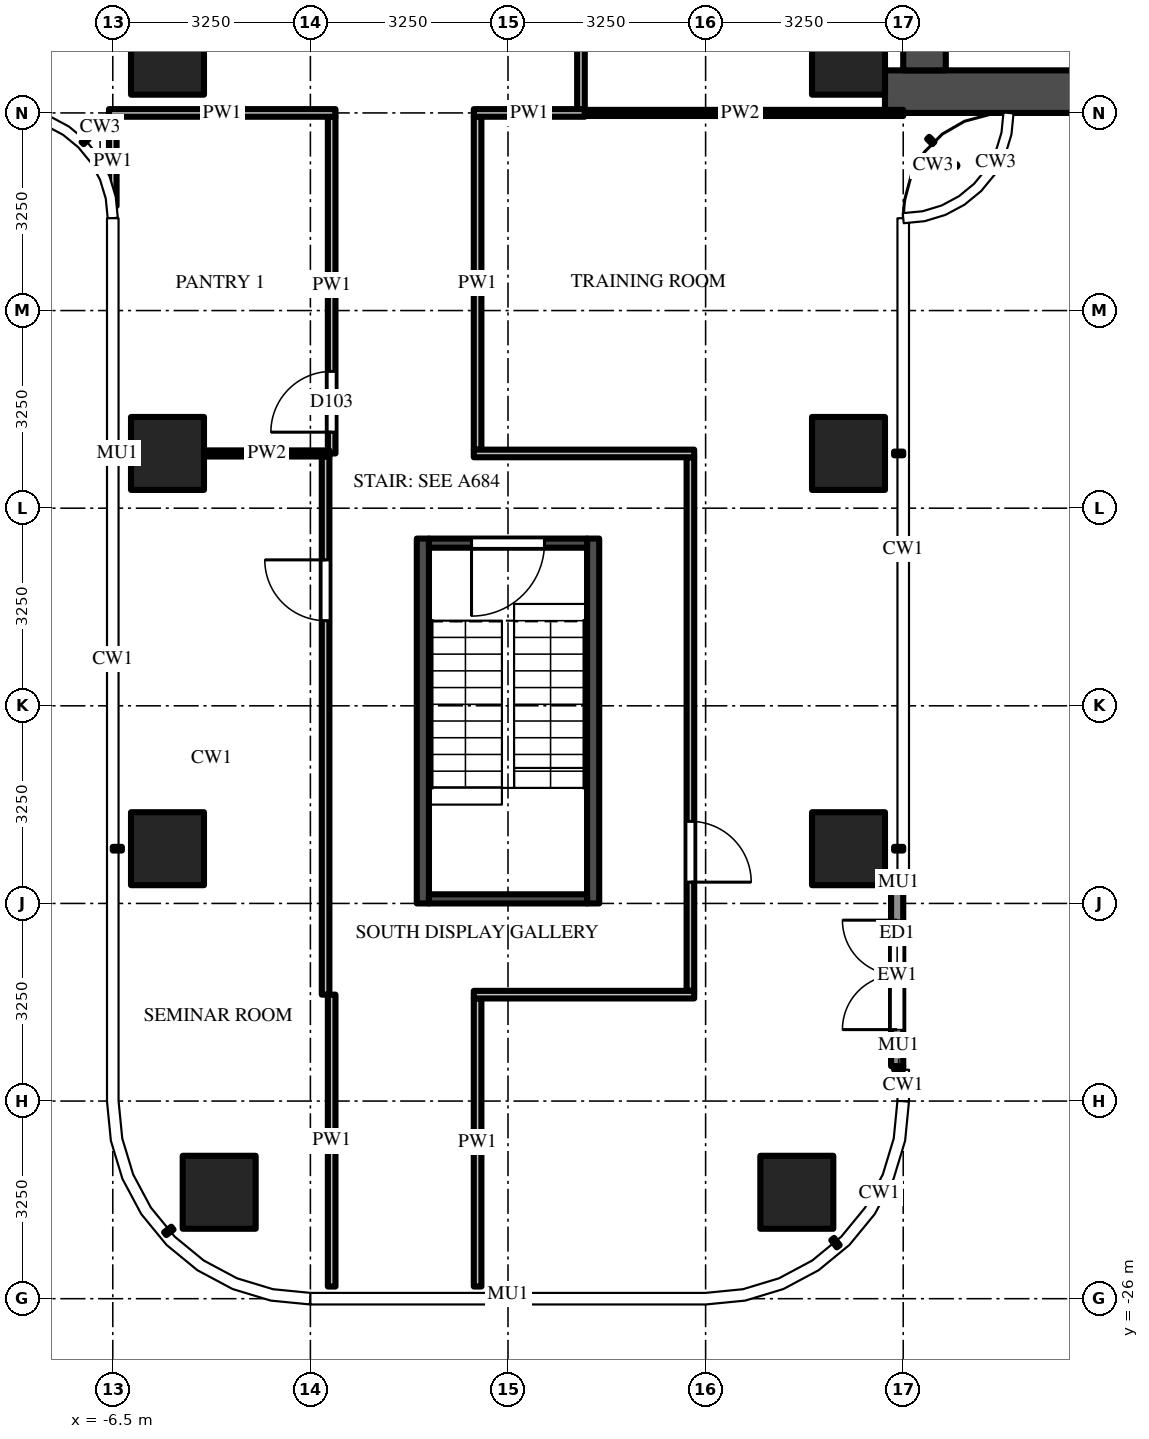
"""IFC4 building model, lengths in metres.
Left out: names, types, materials, properties, quantities, classifications, styles, units other than length and angle.
Written with IfcOpenShell. Run it as: python <this file> out.ifc"""

import sys

from ifc_helpers import new_model, si_unit, direction, frame, frame_2d, origin, origin_2d, place, context, subcontext, project, spatial, rectangle, extrude, source, transform, mapped, element, fill, save


model = new_model("IFC4")
c1 = context("Model", 3, precision=1e-05, world=origin(), true_north=direction((0.0, 1.0)))
c2 = subcontext(c1, "Body", "Model", "MODEL_VIEW")
j1 = project(units=[si_unit("LENGTHUNIT", "METRE"), si_unit("PLANEANGLEUNIT", "RADIAN")], contexts=[c1])
p1 = place(None, origin())
s1 = spatial("IfcSite", under=j1, at=p1, CompositionType="ELEMENT")
p2 = place(p1, origin())
s2 = spatial("IfcBuilding", under=s1, at=p2, CompositionType="ELEMENT")
p3 = place(p2, frame((0.0, 0.0, 169.8)))
s3 = spatial("IfcBuildingStorey", under=s2, at=p3, CompositionType="ELEMENT", Elevation=169.8)
m1 = source(origin(), c2, "Body", "SweptSolid", [
    extrude(rectangle(XDim=1.2, YDim=1.2, at=origin_2d()), origin(), (0.0, 0.0, 1.0), 3.9),
])
for number, where, z_axis, x_axis in (
    (1, (5.6, -5.6, 0.0), (0.0, 0.0, 1.0), (1.0, 0.0, 0.0)),
    (2, (-5.6, -5.6, 0.0), (0.0, 0.0, 1.0), (1.0, 0.0, 0.0)),
    (3, (5.6, -12.1, 0.0), (0.0, 0.0, 1.0), (1.0, 0.0, 0.0)),
    (4, (5.6, -18.6, 0.0), (0.0, 0.0, 1.0), (1.0, 0.0, 0.0)),
    (5, (4.75, -24.25, 0.0), (0.0, 0.0, 1.0), (1.0, 0.0, 0.0)),
    (6, (-5.6, -12.1, 0.0), (0.0, 0.0, 1.0), (1.0, 0.0, 0.0)),
    (7, (-5.6, -18.6, 0.0), (0.0, 0.0, 1.0), (1.0, 0.0, 0.0)),
    (8, (-4.75, -24.25, 0.0), (0.0, 0.0, 1.0), (1.0, 0.0, 0.0)),
):
    element("IfcColumn", number, at=place(p3, frame(where, z_axis=z_axis, x_axis=x_axis)), inside=s3, PredefinedType="COLUMN", context=c2, shape_type="MappedRepresentation", body=[
        mapped(m1, transform((0.0, 0.0, 0.0))),
    ])
m2 = source(origin(), c2, "Body", "SweptSolid", [
    extrude(rectangle(XDim=16.55, YDim=0.7, at=frame_2d((8.275, 0.0))), origin(), (0.0, 0.0, 1.0), 3.7),
])
p4 = place(p3, frame((6.2, -6.15, 0.0), z_axis=(0.0, 0.0, 1.0), x_axis=(1.0, 0.0, 0.0)))
e9 = element("IfcWall", 9, at=p4, inside=s3, PredefinedType="SHEAR", context=c2, shape_type="MappedRepresentation", body=[
    mapped(m2, transform((0.0, 0.0, 0.0))),
])
m3 = source(origin(), c2, "Body", "SweptSolid", [
    extrude(rectangle(XDim=9.05, YDim=0.7, at=frame_2d((4.525, 0.0))), origin(), (0.0, 0.0, 1.0), 3.7),
])
p5 = place(p3, frame((6.85, -5.8, 0.0), z_axis=(0.0, 0.0, 1.0), x_axis=(0.0, 1.0, 0.0)))
e10 = element("IfcWall", 10, at=p5, inside=s3, PredefinedType="SHEAR", context=c2, shape_type="MappedRepresentation", body=[
    mapped(m3, transform((0.0, 0.0, 0.0))),
])
m4 = source(origin(), c2, "Body", "SweptSolid", [
    extrude(rectangle(XDim=1.8, YDim=2.1, at=frame_2d((0.9, 1.05))), frame((0.0, 0.36, 0.0), z_axis=(0.0, -1.0, 0.0), x_axis=(1.0, 0.0, 0.0)), (0.0, 0.0, 1.0), 0.72),
])
p6 = place(p5, frame((3.15, 0.0, 0.0)))
e11 = element("IfcOpeningElement", 11, at=p6, cuts=e10, PredefinedType="OPENING", context=c2, shape_type="MappedRepresentation", body=[
    mapped(m4, transform((0.0, 0.0, 0.0))),
])
m5 = source(origin(), c2, "Body", "SweptSolid", [
    extrude(rectangle(XDim=6.0, YDim=0.2, at=frame_2d((3.0, 0.0))), origin(), (0.0, 0.0, 1.0), 3.7),
])
for number, where, z_axis, x_axis in (
    (12, (1.4, -13.5, 0.0), (0.0, 0.0, 1.0), (0.0, -1.0, 0.0)),
    (13, (-1.4, -13.5, 0.0), (0.0, 0.0, 1.0), (0.0, -1.0, 0.0)),
):
    element("IfcWall", number, at=place(p3, frame(where, z_axis=z_axis, x_axis=x_axis)), inside=s3, PredefinedType="SHEAR", context=c2, shape_type="MappedRepresentation", body=[
        mapped(m5, transform((0.0, 0.0, 0.0))),
    ])
m6 = source(origin(), c2, "Body", "SweptSolid", [
    extrude(rectangle(XDim=2.6, YDim=0.15, at=frame_2d((1.3, 0.0))), origin(), (0.0, 0.0, 1.0), 3.7),
])
p7 = place(p3, frame((1.3, -13.575, 0.0), z_axis=(0.0, 0.0, 1.0), x_axis=(-1.0, 0.0, 0.0)))
e14 = element("IfcWall", 14, at=p7, inside=s3, PredefinedType="SHEAR", context=c2, shape_type="MappedRepresentation", body=[
    mapped(m6, transform((0.0, 0.0, 0.0))),
])
m7 = source(origin(), c2, "Body", "SweptSolid", [
    extrude(rectangle(XDim=1.2, YDim=2.1, at=frame_2d((0.6, 1.05))), frame((0.0, 0.085, 0.0), z_axis=(0.0, -1.0, 0.0), x_axis=(1.0, 0.0, 0.0)), (0.0, 0.0, 1.0), 0.17),
])
p8 = place(p7, frame((0.7, 0.0, 0.0)))
e15 = element("IfcOpeningElement", 15, at=p8, cuts=e14, PredefinedType="OPENING", context=c2, shape_type="MappedRepresentation", body=[
    mapped(m7, transform((0.0, 0.0, 0.0))),
])
p9 = place(p3, frame((1.3, -19.425, 0.0), z_axis=(0.0, 0.0, 1.0), x_axis=(-1.0, 0.0, 0.0)))
e16 = element("IfcWall", 16, at=p9, inside=s3, PredefinedType="SHEAR", context=c2, shape_type="MappedRepresentation", body=[
    mapped(m6, transform((0.0, 0.0, 0.0))),
])
m8 = source(origin(), c2, "Body", "SweptSolid", [
    extrude(rectangle(XDim=3.0, YDim=0.2, at=frame_2d((1.5, 0.0))), origin(), (0.0, 0.0, 1.0), 3.7),
])
p10 = place(p3, frame((6.4, -22.175, 0.0), z_axis=(0.0, 0.0, 1.0), x_axis=(0.0, 1.0, 0.0)))
e17 = element("IfcWall", 17, at=p10, inside=s3, PredefinedType="SOLIDWALL", context=c2, shape_type="MappedRepresentation", body=[
    mapped(m8, transform((0.0, 0.0, 0.0))),
])
m9 = source(origin(), c2, "Body", "SweptSolid", [
    extrude(rectangle(XDim=1.8, YDim=2.4, at=frame_2d((0.9, 1.2))), frame((0.0, 0.11, 0.0), z_axis=(0.0, -1.0, 0.0), x_axis=(1.0, 0.0, 0.0)), (0.0, 0.0, 1.0), 0.22),
])
p11 = place(p10, frame((0.6, 0.0, 0.0)))
e18 = element("IfcOpeningElement", 18, at=p11, cuts=e17, PredefinedType="OPENING", context=c2, shape_type="MappedRepresentation", body=[
    mapped(m9, transform((0.0, 0.0, 0.0))),
])
m10 = source(origin(), c2, "Body", "SweptSolid", [
    extrude(rectangle(XDim=1.469, YDim=0.125, at=frame_2d((0.734, 0.0))), origin(), (0.0, 0.0, 1.0), 3.7),
])
p12 = place(p3, frame((-6.5, -6.562, 0.0), z_axis=(0.0, 0.0, 1.0), x_axis=(0.0, -1.0, 0.0)))
e19 = element("IfcWall", 19, at=p12, inside=s3, PredefinedType="PARTITIONING", context=c2, shape_type="MappedRepresentation", body=[
    mapped(m10, transform((0.0, 0.0, 0.0))),
])
m11 = source(origin(), c2, "Body", "SweptSolid", [
    extrude(rectangle(XDim=8.85, YDim=0.125, at=frame_2d((4.425, 0.0))), origin(), (0.0, 0.0, 1.0), 2.996),
])
p13 = place(p3, frame((-3.0, -21.0, 0.0), z_axis=(0.0, 0.0, 1.0), x_axis=(0.0, 1.0, 0.0)))
e20 = element("IfcWall", 20, at=p13, inside=s3, PredefinedType="PARTITIONING", context=c2, shape_type="MappedRepresentation", body=[
    mapped(m11, transform((0.0, 0.0, 0.0))),
])
m12 = source(origin(), c2, "Body", "SweptSolid", [
    extrude(rectangle(XDim=1.0, YDim=2.1, at=frame_2d((0.5, 1.05))), frame((0.0, 0.073, 0.0), z_axis=(0.0, -1.0, 0.0), x_axis=(1.0, 0.0, 0.0)), (0.0, 0.0, 1.0), 0.145),
])
p14 = place(p13, frame((6.15, 0.0, 0.0)))
e21 = element("IfcOpeningElement", 21, at=p14, cuts=e20, PredefinedType="OPENING", context=c2, shape_type="MappedRepresentation", body=[
    mapped(m12, transform((0.0, 0.0, 0.0))),
])
m13 = source(origin(), c2, "Body", "SweptSolid", [
    extrude(rectangle(XDim=4.8, YDim=0.125, at=frame_2d((2.4, 0.0))), origin(), (0.0, 0.0, 1.0), 2.78),
])
p15 = place(p3, frame((-2.9, -25.8, 0.0), z_axis=(0.0, 0.0, 1.0), x_axis=(0.0, 1.0, 0.0)))
e22 = element("IfcWall", 22, at=p15, inside=s3, PredefinedType="PARTITIONING", context=c2, shape_type="MappedRepresentation", body=[
    mapped(m13, transform((0.0, 0.0, 0.0))),
])
m14 = source(origin(), c2, "Body", "SweptSolid", [
    extrude(rectangle(XDim=5.538, YDim=0.125, at=frame_2d((2.769, 0.0))), origin(), (0.0, 0.0, 1.0), 2.996),
])
p16 = place(p3, frame((-2.9, -12.1, 0.0), z_axis=(0.0, 0.0, 1.0), x_axis=(0.0, 1.0, 0.0)))
e23 = element("IfcWall", 23, at=p16, inside=s3, PredefinedType="PARTITIONING", context=c2, shape_type="MappedRepresentation", body=[
    mapped(m14, transform((0.0, 0.0, 0.0))),
])
p17 = place(p16, frame((0.35, 0.0, 0.0)))
e24 = element("IfcOpeningElement", 24, at=p17, cuts=e23, PredefinedType="OPENING", context=c2, shape_type="MappedRepresentation", body=[
    mapped(m12, transform((0.0, 0.0, 0.0))),
])
m15 = source(origin(), c2, "Body", "SweptSolid", [
    extrude(rectangle(XDim=4.738, YDim=0.125, at=frame_2d((2.369, 0.0))), origin(), (0.0, 0.0, 1.0), 2.78),
])
p18 = place(p3, frame((-0.5, -21.062, 0.0), z_axis=(0.0, 0.0, 1.0), x_axis=(0.0, -1.0, 0.0)))
e25 = element("IfcWall", 25, at=p18, inside=s3, PredefinedType="PARTITIONING", context=c2, shape_type="MappedRepresentation", body=[
    mapped(m15, transform((0.0, 0.0, 0.0))),
])
m16 = source(origin(), c2, "Body", "SweptSolid", [
    extrude(rectangle(XDim=5.475, YDim=0.125, at=frame_2d((2.738, 0.0))), origin(), (0.0, 0.0, 1.0), 2.996),
])
p19 = place(p3, frame((-0.5, -6.562, 0.0), z_axis=(0.0, 0.0, 1.0), x_axis=(0.0, -1.0, 0.0)))
e26 = element("IfcWall", 26, at=p19, inside=s3, PredefinedType="PARTITIONING", context=c2, shape_type="MappedRepresentation", body=[
    mapped(m16, transform((0.0, 0.0, 0.0))),
])
m17 = source(origin(), c2, "Body", "SweptSolid", [
    extrude(rectangle(XDim=3.137, YDim=0.125, at=frame_2d((1.569, 0.0))), origin(), (0.0, 0.0, 1.0), 2.996),
])
p20 = place(p3, frame((1.2, -3.312, 0.0), z_axis=(0.0, 0.0, 1.0), x_axis=(0.0, -1.0, 0.0)))
e27 = element("IfcWall", 27, at=p20, inside=s3, PredefinedType="PARTITIONING", context=c2, shape_type="MappedRepresentation", body=[
    mapped(m17, transform((0.0, 0.0, 0.0))),
])
m18 = source(origin(), c2, "Body", "SweptSolid", [
    extrude(rectangle(XDim=8.775, YDim=0.125, at=frame_2d((4.387, 0.0))), origin(), (0.0, 0.0, 1.0), 2.996),
])
p21 = place(p3, frame((3.0, -12.163, 0.0), z_axis=(0.0, 0.0, 1.0), x_axis=(0.0, -1.0, 0.0)))
e28 = element("IfcWall", 28, at=p21, inside=s3, PredefinedType="PARTITIONING", context=c2, shape_type="MappedRepresentation", body=[
    mapped(m18, transform((0.0, 0.0, 0.0))),
])
p22 = place(p21, frame((5.988, 0.0, 0.0)))
e29 = element("IfcOpeningElement", 29, at=p22, cuts=e28, PredefinedType="OPENING", context=c2, shape_type="MappedRepresentation", body=[
    mapped(m12, transform((0.0, 0.0, 0.0))),
])
m19 = source(origin(), c2, "Body", "SweptSolid", [
    extrude(rectangle(XDim=3.625, YDim=0.125, at=frame_2d((1.812, 0.0))), origin(), (0.0, 0.0, 1.0), 3.7),
])
p23 = place(p3, frame((3.062, -21.0, 0.0), z_axis=(0.0, 0.0, 1.0), x_axis=(-1.0, 0.0, 0.0)))
e30 = element("IfcWall", 30, at=p23, inside=s3, PredefinedType="PARTITIONING", context=c2, shape_type="MappedRepresentation", body=[
    mapped(m19, transform((0.0, 0.0, 0.0))),
])
m20 = source(origin(), c2, "Body", "SweptSolid", [
    extrude(rectangle(XDim=2.062, YDim=0.1, at=frame_2d((1.031, 0.0))), origin(), (0.0, 0.0, 1.0), 2.996),
])
p24 = place(p3, frame((-5.0, -12.1, 0.0), z_axis=(0.0, 0.0, 1.0), x_axis=(1.0, 0.0, 0.0)))
e31 = element("IfcWall", 31, at=p24, inside=s3, PredefinedType="PARTITIONING", context=c2, shape_type="MappedRepresentation", body=[
    mapped(m20, transform((0.0, 0.0, 0.0))),
])
m21 = source(origin(), c2, "Body", "SweptSolid", [
    extrude(rectangle(XDim=3.625, YDim=0.125, at=frame_2d((1.812, 0.0))), origin(), (0.0, 0.0, 1.0), 2.996),
])
p25 = place(p3, frame((-0.562, -12.1, 0.0), z_axis=(0.0, 0.0, 1.0), x_axis=(1.0, 0.0, 0.0)))
e32 = element("IfcWall", 32, at=p25, inside=s3, PredefinedType="PARTITIONING", context=c2, shape_type="MappedRepresentation", body=[
    mapped(m21, transform((0.0, 0.0, 0.0))),
])
m22 = source(origin(), c2, "Body", "SweptSolid", [
    extrude(rectangle(XDim=5.363, YDim=0.1, at=frame_2d((2.681, 0.0))), origin(), (0.0, 0.0, 1.0), 2.78),
])
p26 = place(p3, frame((1.137, -6.5, 0.0), z_axis=(0.0, 0.0, 1.0), x_axis=(1.0, 0.0, 0.0)))
e33 = element("IfcWall", 33, at=p26, inside=s3, PredefinedType="PARTITIONING", context=c2, shape_type="MappedRepresentation", body=[
    mapped(m22, transform((0.0, 0.0, 0.0))),
])
m23 = source(origin(), c2, "Body", "SweptSolid", [
    extrude(rectangle(XDim=3.725, YDim=0.125, at=frame_2d((1.863, 0.0))), origin(), (0.0, 0.0, 1.0), 2.78),
])
p27 = place(p3, frame((-2.837, -6.5, 0.0), z_axis=(0.0, 0.0, 1.0), x_axis=(-1.0, 0.0, 0.0)))
e34 = element("IfcWall", 34, at=p27, inside=s3, PredefinedType="PARTITIONING", context=c2, shape_type="MappedRepresentation", body=[
    mapped(m23, transform((0.0, 0.0, 0.0))),
])
m24 = source(origin(), c2, "Body", "SweptSolid", [
    extrude(rectangle(XDim=1.825, YDim=0.125, at=frame_2d((0.913, 0.0))), origin(), (0.0, 0.0, 1.0), 3.7),
])
p28 = place(p3, frame((1.262, -6.5, 0.0), z_axis=(0.0, 0.0, 1.0), x_axis=(-1.0, 0.0, 0.0)))
e35 = element("IfcWall", 35, at=p28, inside=s3, PredefinedType="PARTITIONING", context=c2, shape_type="MappedRepresentation", body=[
    mapped(m24, transform((0.0, 0.0, 0.0))),
])
m25 = source(origin(), c2, "Body", "SweptSolid", [
    extrude(rectangle(XDim=1.2, YDim=2.1, at=frame_2d((0.6, 1.05))), frame((0.0, 0.025, 0.0), z_axis=(0.0, -1.0, 0.0), x_axis=(1.0, 0.0, 0.0)), (0.0, 0.0, 1.0), 0.05),
])
p29 = place(p8, origin())
e36 = element("IfcDoor", 36, at=p29, inside=s3, OperationType="SINGLE_SWING_RIGHT", PredefinedType="DOOR", context=c2, shape_type="MappedRepresentation", body=[
    mapped(m25, transform((0.0, 0.0, 0.0))),
])
fill(e15, e36)
m26 = source(origin(), c2, "Body", "SweptSolid", [
    extrude(rectangle(XDim=1.8, YDim=2.4, at=frame_2d((0.9, 1.2))), frame((0.0, 0.025, 0.0), z_axis=(0.0, -1.0, 0.0), x_axis=(1.0, 0.0, 0.0)), (0.0, 0.0, 1.0), 0.05),
])
p30 = place(p11, origin())
e37 = element("IfcDoor", 37, at=p30, inside=s3, OperationType="DOUBLE_DOOR_SINGLE_SWING", PredefinedType="DOOR", context=c2, shape_type="MappedRepresentation", body=[
    mapped(m26, transform((0.0, 0.0, 0.0))),
])
fill(e18, e37)
m27 = source(origin(), c2, "Body", "SweptSolid", [
    extrude(rectangle(XDim=1.0, YDim=2.1, at=frame_2d((0.5, 1.05))), frame((0.0, 0.025, 0.0), z_axis=(0.0, -1.0, 0.0), x_axis=(1.0, 0.0, 0.0)), (0.0, 0.0, 1.0), 0.05),
])
p31 = place(p22, origin())
e38 = element("IfcDoor", 38, at=p31, inside=s3, OperationType="SINGLE_SWING_RIGHT", PredefinedType="DOOR", context=c2, shape_type="MappedRepresentation", body=[
    mapped(m27, transform((0.0, 0.0, 0.0))),
])
fill(e29, e38)
p32 = place(p14, origin())
e39 = element("IfcDoor", 39, at=p32, inside=s3, OperationType="SINGLE_SWING_RIGHT", PredefinedType="DOOR", context=c2, shape_type="MappedRepresentation", body=[
    mapped(m27, transform((0.0, 0.0, 0.0))),
])
fill(e21, e39)
p33 = place(p17, origin())
e40 = element("IfcDoor", 40, at=p33, inside=s3, OperationType="SINGLE_SWING_LEFT", PredefinedType="DOOR", context=c2, shape_type="MappedRepresentation", body=[
    mapped(m27, transform((0.0, 0.0, 0.0))),
])
fill(e24, e40)
save(model, sys.argv[1])
